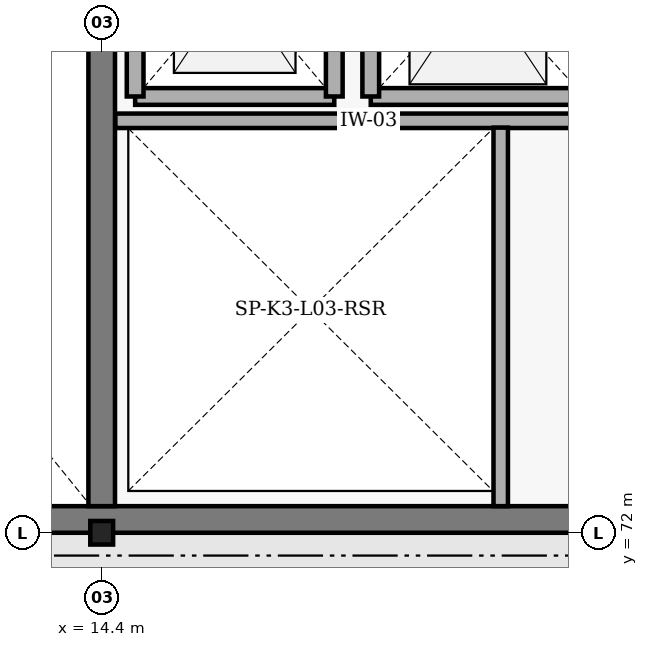
"""IFC4 building model, lengths in metres.
Left out: names, types, materials, properties, quantities, classifications, styles, units other than length and angle.
Written with IfcOpenShell. Run it as: python <this file> out.ifc"""

import sys

from ifc_helpers import new_model, si_unit, direction, frame, frame_2d, origin, origin_2d, place, context, subcontext, project, spatial, rectangle, i_section, extrude, element, save


model = new_model("IFC4")
c1 = context("Model", 3, precision=1e-05, world=origin(), true_north=direction((0.0, 1.0)))
c2 = subcontext(c1, "Body", "Model", "MODEL_VIEW")
j1 = project(units=[si_unit("LENGTHUNIT", "METRE"), si_unit("PLANEANGLEUNIT", "RADIAN")], contexts=[c1])
p1 = place(None, origin())
s1 = spatial("IfcSite", under=j1, at=p1, CompositionType="ELEMENT")
p2 = place(p1, origin())
s2 = spatial("IfcBuilding", under=s1, at=p2, CompositionType="ELEMENT")
p3 = place(p2, frame((0.0, 0.0, 13.8)))
s3 = spatial("IfcBuildingStorey", under=s2, at=p3, CompositionType="ELEMENT", Elevation=13.8)
p4 = place(p3, frame((21.6, 72.175, 0.0), z_axis=(0.0, 0.0, 1.0), x_axis=(-1.0, 0.0, 0.0)))
e1 = element("IfcWall", 1, at=p4, inside=s3, PredefinedType="SHEAR", context=c2, shape_type="SweptSolid", body=[
    extrude(rectangle(XDim=14.4, YDim=0.35, at=frame_2d((7.2, 0.0))), origin(), (0.0, 0.0, 1.0), 4.2),
])
p5 = place(p3, frame((14.4, 86.05, 0.0), z_axis=(0.0, 0.0, 1.0), x_axis=(0.0, -1.0, 0.0)))
e2 = element("IfcWall", 2, at=p5, inside=s3, PredefinedType="SHEAR", context=c2, shape_type="SweptSolid", body=[
    extrude(rectangle(XDim=13.7, YDim=0.35, at=frame_2d((6.85, 0.0))), origin(), (0.0, 0.0, 1.0), 4.2),
])
p6 = place(p5, frame((1.5, 0.0, 0.0)))
e3 = element("IfcOpeningElement", 3, at=p6, cuts=e2, PredefinedType="OPENING", context=c2, shape_type="SweptSolid", body=[
    extrude(rectangle(XDim=1.25, YDim=2.2, at=frame_2d((0.625, 1.1))), frame((0.0, 0.185, 0.0), z_axis=(0.0, -1.0, 0.0), x_axis=(1.0, 0.0, 0.0)), (0.0, 0.0, 1.0), 0.37),
])
p7 = place(p3, frame((14.4, 72.0, 0.0), z_axis=(0.0, 0.0, 1.0), x_axis=(1.0, 0.0, 0.0)))
e4 = element("IfcColumn", 4, at=p7, inside=s3, PredefinedType="COLUMN", context=c2, shape_type="SweptSolid", body=[
    extrude(i_section(OverallWidth=0.3, OverallDepth=0.31, WebThickness=0.009, FlangeThickness=0.015, FilletRadius=0.027, at=origin_2d()), origin(), (0.0, 0.0, 1.0), 3.98),
])
p8 = place(p3, frame((14.58, 77.42, 0.0), z_axis=(0.0, 0.0, 1.0), x_axis=(1.0, 0.0, 0.0)))
e5 = element("IfcWall", 5, at=p8, inside=s3, PredefinedType="PARTITIONING", context=c2, shape_type="SweptSolid", body=[
    extrude(rectangle(XDim=6.67, YDim=0.19, at=frame_2d((3.335, 0.0))), origin(), (0.0, 0.0, 1.0), 3.85),
])
p9 = place(p3, frame((19.65, 72.35, 0.0), z_axis=(0.0, 0.0, 1.0), x_axis=(0.0, 1.0, 0.0)))
e6 = element("IfcWall", 6, at=p9, inside=s3, PredefinedType="PARTITIONING", context=c2, shape_type="SweptSolid", body=[
    extrude(rectangle(XDim=4.98, YDim=0.19, at=frame_2d((2.49, 0.0))), origin(), (0.0, 0.0, 1.0), 3.85),
])
p10 = place(p3, frame((14.84, 77.74, 0.0), z_axis=(0.0, 0.0, 1.0), x_axis=(1.0, 0.0, 0.0)))
e7 = element("IfcWall", 7, at=p10, inside=s3, PredefinedType="PARTITIONING", context=c2, shape_type="SweptSolid", body=[
    extrude(rectangle(XDim=2.62, YDim=0.22, at=frame_2d((1.31, 0.0))), origin(), (0.0, 0.0, 1.0), 3.85),
])
for number, where, z_axis, x_axis in (
    (8, (14.84, 77.74, 0.0), (0.0, 0.0, 1.0), (0.0, 1.0, 0.0)),
    (9, (17.46, 77.74, 0.0), (0.0, 0.0, 1.0), (0.0, 1.0, 0.0)),
):
    element("IfcWall", number, at=place(p3, frame(where, z_axis=z_axis, x_axis=x_axis)), inside=s3, PredefinedType="PARTITIONING", context=c2, shape_type="SweptSolid", body=[
        extrude(rectangle(XDim=3.0, YDim=0.22, at=frame_2d((1.5, 0.0))), origin(), (0.0, 0.0, 1.0), 3.85),
    ])
p11 = place(p3, frame((17.94, 77.74, 0.0), z_axis=(0.0, 0.0, 1.0), x_axis=(1.0, 0.0, 0.0)))
e10 = element("IfcWall", 10, at=p11, inside=s3, PredefinedType="PARTITIONING", context=c2, shape_type="SweptSolid", body=[
    extrude(rectangle(XDim=2.82, YDim=0.22, at=frame_2d((1.41, 0.0))), origin(), (0.0, 0.0, 1.0), 3.85),
])
p12 = place(p3, frame((17.94, 77.74, 0.0), z_axis=(0.0, 0.0, 1.0), x_axis=(0.0, 1.0, 0.0)))
e11 = element("IfcWall", 11, at=p12, inside=s3, PredefinedType="PARTITIONING", context=c2, shape_type="SweptSolid", body=[
    extrude(rectangle(XDim=3.0, YDim=0.22, at=frame_2d((1.5, 0.0))), origin(), (0.0, 0.0, 1.0), 3.85),
])
save(model, sys.argv[1])
